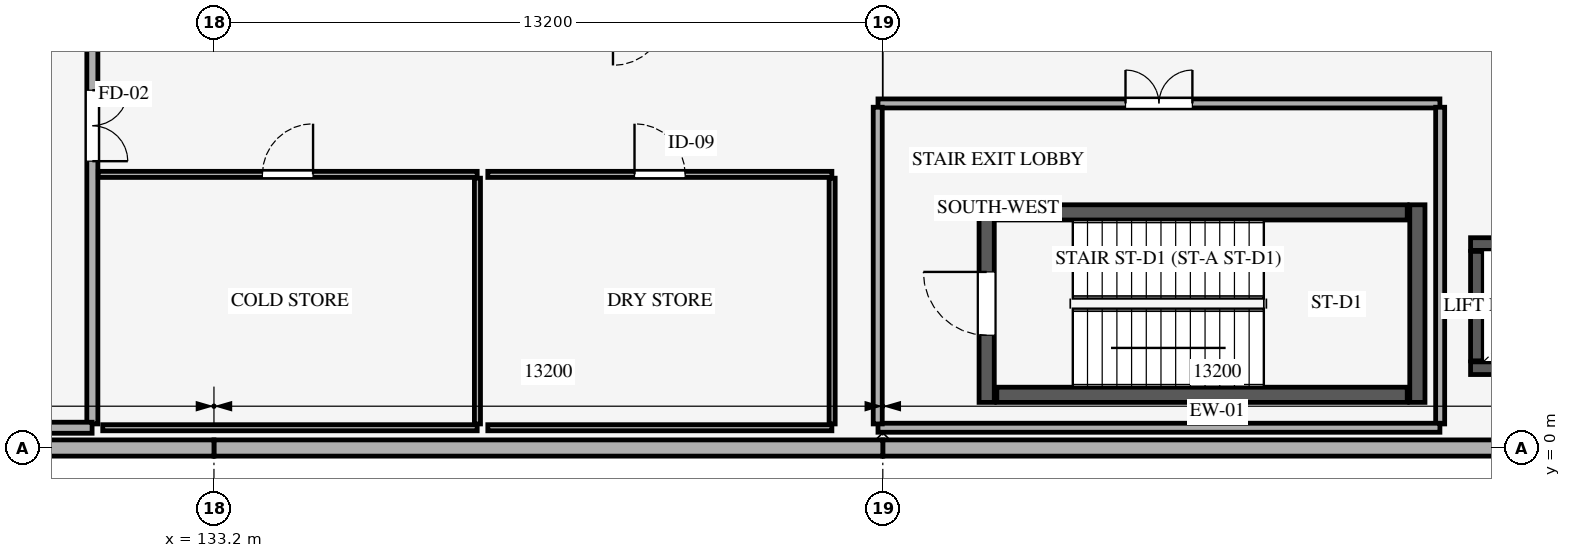
"""IFC4 building model, lengths in metres.
Left out: names, types, materials, properties, quantities, classifications, styles, units other than length and angle.
Written with IfcOpenShell. Run it as: python <this file> out.ifc"""

import sys

from ifc_helpers import new_model, si_unit, direction, frame, frame_2d, origin, origin_2d, place, context, subcontext, project, spatial, rectangle, extrude, element, fill, save


model = new_model("IFC4")
c1 = context("Model", 3, precision=1e-05, world=origin(), true_north=direction((0.0, 1.0)))
c2 = subcontext(c1, "Body", "Model", "MODEL_VIEW")
j1 = project(units=[si_unit("LENGTHUNIT", "METRE"), si_unit("PLANEANGLEUNIT", "RADIAN")], contexts=[c1])
p1 = place(None, origin())
s1 = spatial("IfcSite", under=j1, at=p1, CompositionType="ELEMENT")
p2 = place(p1, origin())
s2 = spatial("IfcBuilding", under=s1, at=p2, CompositionType="ELEMENT")
p3 = place(p2, origin())
s3 = spatial("IfcBuildingStorey", under=s2, at=p3, CompositionType="ELEMENT", Elevation=0.0)
for number, where, z_axis, x_axis in (
    (1, (133.2, 0.0, 0.0), (0.0, 0.0, 1.0), (1.0, 0.0, 0.0)),
    (2, (146.4, 0.0, 0.0), (0.0, 0.0, 1.0), (1.0, 0.0, 0.0)),
):
    element("IfcColumn", number, at=place(p3, frame(where, z_axis=z_axis, x_axis=x_axis)), inside=s3, PredefinedType="COLUMN", context=c2, shape_type="SweptSolid", body=[
        extrude(rectangle(XDim=0.85, YDim=0.85, at=origin_2d()), origin(), (0.0, 0.0, 1.0), 4.8),
    ])
p4 = place(p3, frame((159.6, 0.0, 0.0), z_axis=(0.0, 0.0, 1.0), x_axis=(-1.0, 0.0, 0.0)))
e3 = element("IfcWall", 3, at=p4, inside=s3, PredefinedType="STANDARD", context=c2, shape_type="SweptSolid", body=[
    extrude(rectangle(XDim=13.2, YDim=0.32, at=frame_2d((6.6, 0.0))), origin(), (0.0, 0.0, 1.0), 3.67),
])
p5 = place(p4, frame((3.324, 0.0, 1.2)))
e4 = element("IfcOpeningElement", 4, at=p5, cuts=e3, PredefinedType="OPENING", context=c2, shape_type="SweptSolid", body=[
    extrude(rectangle(XDim=1.8, YDim=1.35, at=frame_2d((0.9, 0.675))), frame((0.0, 0.17, 0.0), z_axis=(0.0, -1.0, 0.0), x_axis=(1.0, 0.0, 0.0)), (0.0, 0.0, 1.0), 0.34),
])
p6 = place(p4, frame((8.076, 0.0, 1.2)))
e5 = element("IfcOpeningElement", 5, at=p6, cuts=e3, PredefinedType="OPENING", context=c2, shape_type="SweptSolid", body=[
    extrude(rectangle(XDim=1.8, YDim=1.35, at=frame_2d((0.9, 0.675))), frame((0.0, 0.17, 0.0), z_axis=(0.0, -1.0, 0.0), x_axis=(1.0, 0.0, 0.0)), (0.0, 0.0, 1.0), 0.34),
])
p7 = place(p3, frame((146.4, 0.0, 0.0), z_axis=(0.0, 0.0, 1.0), x_axis=(-1.0, 0.0, 0.0)))
e6 = element("IfcWall", 6, at=p7, inside=s3, PredefinedType="STANDARD", context=c2, shape_type="SweptSolid", body=[
    extrude(rectangle(XDim=13.2, YDim=0.32, at=frame_2d((6.6, 0.0))), origin(), (0.0, 0.0, 1.0), 3.67),
])
p8 = place(p7, frame((3.324, 0.0, 1.2)))
e7 = element("IfcOpeningElement", 7, at=p8, cuts=e6, PredefinedType="OPENING", context=c2, shape_type="SweptSolid", body=[
    extrude(rectangle(XDim=1.8, YDim=1.35, at=frame_2d((0.9, 0.675))), frame((0.0, 0.17, 0.0), z_axis=(0.0, -1.0, 0.0), x_axis=(1.0, 0.0, 0.0)), (0.0, 0.0, 1.0), 0.34),
])
p9 = place(p7, frame((8.426, 0.0, 1.2)))
e8 = element("IfcOpeningElement", 8, at=p9, cuts=e6, PredefinedType="OPENING", context=c2, shape_type="SweptSolid", body=[
    extrude(rectangle(XDim=1.8, YDim=1.35, at=frame_2d((0.9, 0.675))), frame((0.0, 0.17, 0.0), z_axis=(0.0, -1.0, 0.0), x_axis=(1.0, 0.0, 0.0)), (0.0, 0.0, 1.0), 0.34),
])
p10 = place(p3, frame((133.2, 0.0, 0.0), z_axis=(0.0, 0.0, 1.0), x_axis=(-1.0, 0.0, 0.0)))
e9 = element("IfcWall", 9, at=p10, inside=s3, PredefinedType="STANDARD", context=c2, shape_type="SweptSolid", body=[
    extrude(rectangle(XDim=9.6, YDim=0.32, at=frame_2d((4.8, 0.0))), origin(), (0.0, 0.0, 1.0), 3.67),
])
p11 = place(p10, frame((3.975, 0.0, 0.0)))
e10 = element("IfcOpeningElement", 10, at=p11, cuts=e9, PredefinedType="OPENING", context=c2, shape_type="SweptSolid", body=[
    extrude(rectangle(XDim=1.65, YDim=2.2, at=frame_2d((0.825, 1.1))), frame((0.0, 0.17, 0.0), z_axis=(0.0, -1.0, 0.0), x_axis=(1.0, 0.0, 0.0)), (0.0, 0.0, 1.0), 0.34),
])
p12 = place(p3, frame((148.45, 4.8, 0.0), z_axis=(0.0, 0.0, 1.0), x_axis=(0.0, -1.0, 0.0)))
e11 = element("IfcWall", 11, at=p12, inside=s3, PredefinedType="SHEAR", context=c2, shape_type="SweptSolid", body=[
    extrude(rectangle(XDim=3.9, YDim=0.3, at=frame_2d((1.95, 0.0))), origin(), (0.0, 0.0, 1.0), 4.495),
])
p13 = place(p12, frame((1.325, 0.0, 0.0)))
e12 = element("IfcOpeningElement", 12, at=p13, cuts=e11, PredefinedType="OPENING", context=c2, shape_type="SweptSolid", body=[
    extrude(rectangle(XDim=1.25, YDim=2.2, at=frame_2d((0.625, 1.1))), frame((0.0, 0.16, 0.0), z_axis=(0.0, -1.0, 0.0), x_axis=(1.0, 0.0, 0.0)), (0.0, 0.0, 1.0), 0.32),
])
p14 = place(p3, frame((148.65, 1.05, 0.0), z_axis=(0.0, 0.0, 1.0), x_axis=(1.0, 0.0, 0.0)))
e13 = element("IfcWall", 13, at=p14, inside=s3, PredefinedType="SHEAR", context=c2, shape_type="SweptSolid", body=[
    extrude(rectangle(XDim=8.1, YDim=0.3, at=frame_2d((4.05, 0.0))), origin(), (0.0, 0.0, 1.0), 4.495),
])
p15 = place(p3, frame((156.95, 0.9, 0.0), z_axis=(0.0, 0.0, 1.0), x_axis=(0.0, 1.0, 0.0)))
e14 = element("IfcWall", 14, at=p15, inside=s3, PredefinedType="SHEAR", context=c2, shape_type="SweptSolid", body=[
    extrude(rectangle(XDim=3.9, YDim=0.3, at=frame_2d((1.95, 0.0))), origin(), (0.0, 0.0, 1.0), 4.495),
])
p16 = place(p3, frame((156.75, 4.65, 0.0), z_axis=(0.0, 0.0, 1.0), x_axis=(-1.0, 0.0, 0.0)))
e15 = element("IfcWall", 15, at=p16, inside=s3, PredefinedType="SHEAR", context=c2, shape_type="SweptSolid", body=[
    extrude(rectangle(XDim=8.1, YDim=0.3, at=frame_2d((4.05, 0.0))), origin(), (0.0, 0.0, 1.0), 4.495),
])
p17 = place(p3, frame((160.8, 1.575, 0.0), z_axis=(0.0, 0.0, 1.0), x_axis=(-1.0, 0.0, 0.0)))
e16 = element("IfcWall", 16, at=p17, inside=s3, PredefinedType="SHEAR", context=c2, shape_type="SweptSolid", body=[
    extrude(rectangle(XDim=2.8, YDim=0.25, at=frame_2d((1.4, 0.0))), origin(), (0.0, 0.0, 1.0), 4.52),
])
p18 = place(p3, frame((158.125, 1.72, 0.0), z_axis=(0.0, 0.0, 1.0), x_axis=(0.0, 1.0, 0.0)))
e17 = element("IfcWall", 17, at=p18, inside=s3, PredefinedType="SHEAR", context=c2, shape_type="SweptSolid", body=[
    extrude(rectangle(XDim=2.16, YDim=0.25, at=frame_2d((1.08, 0.0))), origin(), (0.0, 0.0, 1.0), 4.52),
])
p19 = place(p3, frame((158.0, 4.025, 0.0), z_axis=(0.0, 0.0, 1.0), x_axis=(1.0, 0.0, 0.0)))
e18 = element("IfcWall", 18, at=p19, inside=s3, PredefinedType="SHEAR", context=c2, shape_type="SweptSolid", body=[
    extrude(rectangle(XDim=2.8, YDim=0.25, at=frame_2d((1.4, 0.0))), origin(), (0.0, 0.0, 1.0), 4.52),
])
p20 = place(p19, frame((0.9, 0.0, 0.0)))
e19 = element("IfcOpeningElement", 19, at=p20, cuts=e18, PredefinedType="OPENING", context=c2, shape_type="SweptSolid", body=[
    extrude(rectangle(XDim=1.0, YDim=2.15, at=frame_2d((0.5, 1.075))), frame((0.0, 0.135, 0.0), z_axis=(0.0, -1.0, 0.0), x_axis=(1.0, 0.0, 0.0)), (0.0, 0.0, 1.0), 0.27),
])
p21 = place(p3, frame((146.305, 6.8, 0.0), z_axis=(0.0, 0.0, 1.0), x_axis=(1.0, 0.0, 0.0)))
e20 = element("IfcWall", 20, at=p21, inside=s3, PredefinedType="STANDARD", context=c2, shape_type="SweptSolid", body=[
    extrude(rectangle(XDim=11.09, YDim=0.178, at=frame_2d((5.545, 0.0))), origin(), (0.0, 0.0, 1.0), 4.49),
])
p22 = place(p21, frame((4.885, 0.0, 0.0)))
e21 = element("IfcOpeningElement", 21, at=p22, cuts=e20, PredefinedType="OPENING", context=c2, shape_type="SweptSolid", body=[
    extrude(rectangle(XDim=1.32, YDim=2.22, at=frame_2d((0.66, 1.11))), frame((0.0, 0.099, 0.0), z_axis=(0.0, -1.0, 0.0), x_axis=(1.0, 0.0, 0.0)), (0.0, 0.0, 1.0), 0.198),
])
p23 = place(p3, frame((157.4, 6.725, 0.0), z_axis=(0.0, 0.0, 1.0), x_axis=(0.0, -1.0, 0.0)))
e22 = element("IfcWall", 22, at=p23, inside=s3, PredefinedType="STANDARD", context=c2, shape_type="SweptSolid", body=[
    extrude(rectangle(XDim=6.25, YDim=0.178, at=frame_2d((3.125, 0.0))), origin(), (0.0, 0.0, 1.0), 3.67),
])
p24 = place(p3, frame((157.395, 0.4, 0.0), z_axis=(0.0, 0.0, 1.0), x_axis=(-1.0, 0.0, 0.0)))
e23 = element("IfcWall", 23, at=p24, inside=s3, PredefinedType="STANDARD", context=c2, shape_type="SweptSolid", body=[
    extrude(rectangle(XDim=11.09, YDim=0.178, at=frame_2d((5.545, 0.0))), origin(), (0.0, 0.0, 1.0), 3.67),
])
p25 = place(p3, frame((146.3, 0.475, 0.0), z_axis=(0.0, 0.0, 1.0), x_axis=(0.0, 1.0, 0.0)))
e24 = element("IfcWall", 24, at=p25, inside=s3, PredefinedType="STANDARD", context=c2, shape_type="SweptSolid", body=[
    extrude(rectangle(XDim=6.25, YDim=0.178, at=frame_2d((3.125, 0.0))), origin(), (0.0, 0.0, 1.0), 3.67),
])
p26 = place(p3, frame((130.8, 8.523, 0.0), z_axis=(0.0, 0.0, 1.0), x_axis=(0.0, -1.0, 0.0)))
e25 = element("IfcWall", 25, at=p26, inside=s3, PredefinedType="STANDARD", context=c2, shape_type="SweptSolid", body=[
    extrude(rectangle(XDim=8.048, YDim=0.218, at=frame_2d((4.024, 0.0))), origin(), (0.0, 0.0, 1.0), 3.62),
])
p27 = place(p26, frame((1.463, 0.0, 0.0)))
e26 = element("IfcOpeningElement", 26, at=p27, cuts=e25, PredefinedType="OPENING", context=c2, shape_type="SweptSolid", body=[
    extrude(rectangle(XDim=1.4, YDim=2.2, at=frame_2d((0.7, 1.1))), frame((0.0, 0.119, 0.0), z_axis=(0.0, -1.0, 0.0), x_axis=(1.0, 0.0, 0.0)), (0.0, 0.0, 1.0), 0.238),
])
p28 = place(p3, frame((130.795, 0.4, 0.0), z_axis=(0.0, 0.0, 1.0), x_axis=(-1.0, 0.0, 0.0)))
e27 = element("IfcWall", 27, at=p28, inside=s3, PredefinedType="STANDARD", context=c2, shape_type="SweptSolid", body=[
    extrude(rectangle(XDim=1.425, YDim=0.218, at=frame_2d((0.712, 0.0))), origin(), (0.0, 0.0, 1.0), 3.67),
])
p29 = place(p3, frame((138.4, 5.325, 0.0), z_axis=(0.0, 0.0, 1.0), x_axis=(0.0, -1.0, 0.0)))
e28 = element("IfcWall", 28, at=p29, inside=s3, PredefinedType="STANDARD", context=c2, shape_type="SweptSolid", body=[
    extrude(rectangle(XDim=4.85, YDim=0.12, at=frame_2d((2.425, 0.0))), origin(), (0.0, 0.0, 1.0), 4.49),
])
p30 = place(p3, frame((138.395, 0.4, 0.0), z_axis=(0.0, 0.0, 1.0), x_axis=(-1.0, 0.0, 0.0)))
e29 = element("IfcWall", 29, at=p30, inside=s3, PredefinedType="STANDARD", context=c2, shape_type="SweptSolid", body=[
    extrude(rectangle(XDim=7.39, YDim=0.12, at=frame_2d((3.695, 0.0))), origin(), (0.0, 0.0, 1.0), 3.67),
])
p31 = place(p3, frame((130.917, 5.4, 0.0), z_axis=(0.0, 0.0, 1.0), x_axis=(1.0, 0.0, 0.0)))
e30 = element("IfcWall", 30, at=p31, inside=s3, PredefinedType="STANDARD", context=c2, shape_type="SweptSolid", body=[
    extrude(rectangle(XDim=7.478, YDim=0.12, at=frame_2d((3.739, 0.0))), origin(), (0.0, 0.0, 1.0), 4.49),
])
p32 = place(p31, frame((3.239, 0.0, 0.0)))
e31 = element("IfcOpeningElement", 31, at=p32, cuts=e30, PredefinedType="OPENING", context=c2, shape_type="SweptSolid", body=[
    extrude(rectangle(XDim=1.0, YDim=2.1, at=frame_2d((0.5, 1.05))), frame((0.0, 0.07, 0.0), z_axis=(0.0, -1.0, 0.0), x_axis=(1.0, 0.0, 0.0)), (0.0, 0.0, 1.0), 0.14),
])
p33 = place(p3, frame((145.4, 5.325, 0.0), z_axis=(0.0, 0.0, 1.0), x_axis=(0.0, -1.0, 0.0)))
e32 = element("IfcWall", 32, at=p33, inside=s3, PredefinedType="STANDARD", context=c2, shape_type="SweptSolid", body=[
    extrude(rectangle(XDim=4.85, YDim=0.12, at=frame_2d((2.425, 0.0))), origin(), (0.0, 0.0, 1.0), 4.49),
])
p34 = place(p3, frame((145.395, 0.4, 0.0), z_axis=(0.0, 0.0, 1.0), x_axis=(-1.0, 0.0, 0.0)))
e33 = element("IfcWall", 33, at=p34, inside=s3, PredefinedType="STANDARD", context=c2, shape_type="SweptSolid", body=[
    extrude(rectangle(XDim=6.79, YDim=0.12, at=frame_2d((3.395, 0.0))), origin(), (0.0, 0.0, 1.0), 4.49),
])
p35 = place(p3, frame((138.605, 5.4, 0.0), z_axis=(0.0, 0.0, 1.0), x_axis=(1.0, 0.0, 0.0)))
e34 = element("IfcWall", 34, at=p35, inside=s3, PredefinedType="STANDARD", context=c2, shape_type="SweptSolid", body=[
    extrude(rectangle(XDim=6.79, YDim=0.12, at=frame_2d((3.395, 0.0))), origin(), (0.0, 0.0, 1.0), 4.49),
])
p36 = place(p35, frame((2.895, 0.0, 0.0)))
e35 = element("IfcOpeningElement", 35, at=p36, cuts=e34, PredefinedType="OPENING", context=c2, shape_type="SweptSolid", body=[
    extrude(rectangle(XDim=1.0, YDim=2.1, at=frame_2d((0.5, 1.05))), frame((0.0, 0.07, 0.0), z_axis=(0.0, -1.0, 0.0), x_axis=(1.0, 0.0, 0.0)), (0.0, 0.0, 1.0), 0.14),
])
p37 = place(p5, origin())
e36 = element("IfcWindow", 36, at=p37, inside=s3, PartitioningType="SINGLE_PANEL", PredefinedType="WINDOW", context=c2, shape_type="SweptSolid", body=[
    extrude(rectangle(XDim=1.8, YDim=1.35, at=frame_2d((0.9, 0.675))), frame((0.0, 0.03, 0.0), z_axis=(0.0, -1.0, 0.0), x_axis=(1.0, 0.0, 0.0)), (0.0, 0.0, 1.0), 0.06),
])
fill(e4, e36)
p38 = place(p6, origin())
e37 = element("IfcWindow", 37, at=p38, inside=s3, PartitioningType="SINGLE_PANEL", PredefinedType="WINDOW", context=c2, shape_type="SweptSolid", body=[
    extrude(rectangle(XDim=1.8, YDim=1.35, at=frame_2d((0.9, 0.675))), frame((0.0, 0.03, 0.0), z_axis=(0.0, -1.0, 0.0), x_axis=(1.0, 0.0, 0.0)), (0.0, 0.0, 1.0), 0.06),
])
fill(e5, e37)
p39 = place(p8, origin())
e38 = element("IfcWindow", 38, at=p39, inside=s3, PartitioningType="SINGLE_PANEL", PredefinedType="WINDOW", context=c2, shape_type="SweptSolid", body=[
    extrude(rectangle(XDim=1.8, YDim=1.35, at=frame_2d((0.9, 0.675))), frame((0.0, 0.03, 0.0), z_axis=(0.0, -1.0, 0.0), x_axis=(1.0, 0.0, 0.0)), (0.0, 0.0, 1.0), 0.06),
])
fill(e7, e38)
p40 = place(p9, origin())
e39 = element("IfcWindow", 39, at=p40, inside=s3, PartitioningType="SINGLE_PANEL", PredefinedType="WINDOW", context=c2, shape_type="SweptSolid", body=[
    extrude(rectangle(XDim=1.8, YDim=1.35, at=frame_2d((0.9, 0.675))), frame((0.0, 0.03, 0.0), z_axis=(0.0, -1.0, 0.0), x_axis=(1.0, 0.0, 0.0)), (0.0, 0.0, 1.0), 0.06),
])
fill(e8, e39)
p41 = place(p13, frame((1.25, 0.0, 0.0), z_axis=(0.0, 0.0, 1.0), x_axis=(-1.0, 0.0, 0.0)))
e40 = element("IfcDoor", 40, at=p41, inside=s3, OperationType="SINGLE_SWING_LEFT", PredefinedType="DOOR", context=c2, shape_type="SweptSolid", body=[
    extrude(rectangle(XDim=1.25, YDim=2.2, at=frame_2d((0.625, 1.1))), frame((0.0, 0.025, 0.0), z_axis=(0.0, -1.0, 0.0), x_axis=(1.0, 0.0, 0.0)), (0.0, 0.0, 1.0), 0.05),
])
fill(e12, e40)
p42 = place(p22, origin())
e41 = element("IfcDoor", 41, at=p42, inside=s3, OperationType="DOUBLE_DOOR_SINGLE_SWING", PredefinedType="DOOR", context=c2, shape_type="SweptSolid", body=[
    extrude(rectangle(XDim=1.32, YDim=2.22, at=frame_2d((0.66, 1.11))), frame((0.0, 0.025, 0.0), z_axis=(0.0, -1.0, 0.0), x_axis=(1.0, 0.0, 0.0)), (0.0, 0.0, 1.0), 0.05),
])
fill(e21, e41)
p43 = place(p27, origin())
e42 = element("IfcDoor", 42, at=p43, inside=s3, OperationType="DOUBLE_DOOR_SINGLE_SWING", PredefinedType="DOOR", context=c2, shape_type="SweptSolid", body=[
    extrude(rectangle(XDim=1.4, YDim=2.2, at=frame_2d((0.7, 1.1))), frame((0.0, 0.025, 0.0), z_axis=(0.0, -1.0, 0.0), x_axis=(1.0, 0.0, 0.0)), (0.0, 0.0, 1.0), 0.05),
])
fill(e26, e42)
p44 = place(p32, origin())
e43 = element("IfcDoor", 43, at=p44, inside=s3, OperationType="SINGLE_SWING_RIGHT", PredefinedType="DOOR", context=c2, shape_type="SweptSolid", body=[
    extrude(rectangle(XDim=1.0, YDim=2.1, at=frame_2d((0.5, 1.05))), frame((0.0, 0.025, 0.0), z_axis=(0.0, -1.0, 0.0), x_axis=(1.0, 0.0, 0.0)), (0.0, 0.0, 1.0), 0.05),
])
fill(e31, e43)
p45 = place(p36, origin())
e44 = element("IfcDoor", 44, at=p45, inside=s3, OperationType="SINGLE_SWING_LEFT", PredefinedType="DOOR", context=c2, shape_type="SweptSolid", body=[
    extrude(rectangle(XDim=1.0, YDim=2.1, at=frame_2d((0.5, 1.05))), frame((0.0, 0.025, 0.0), z_axis=(0.0, -1.0, 0.0), x_axis=(1.0, 0.0, 0.0)), (0.0, 0.0, 1.0), 0.05),
])
fill(e35, e44)
save(model, sys.argv[1])
